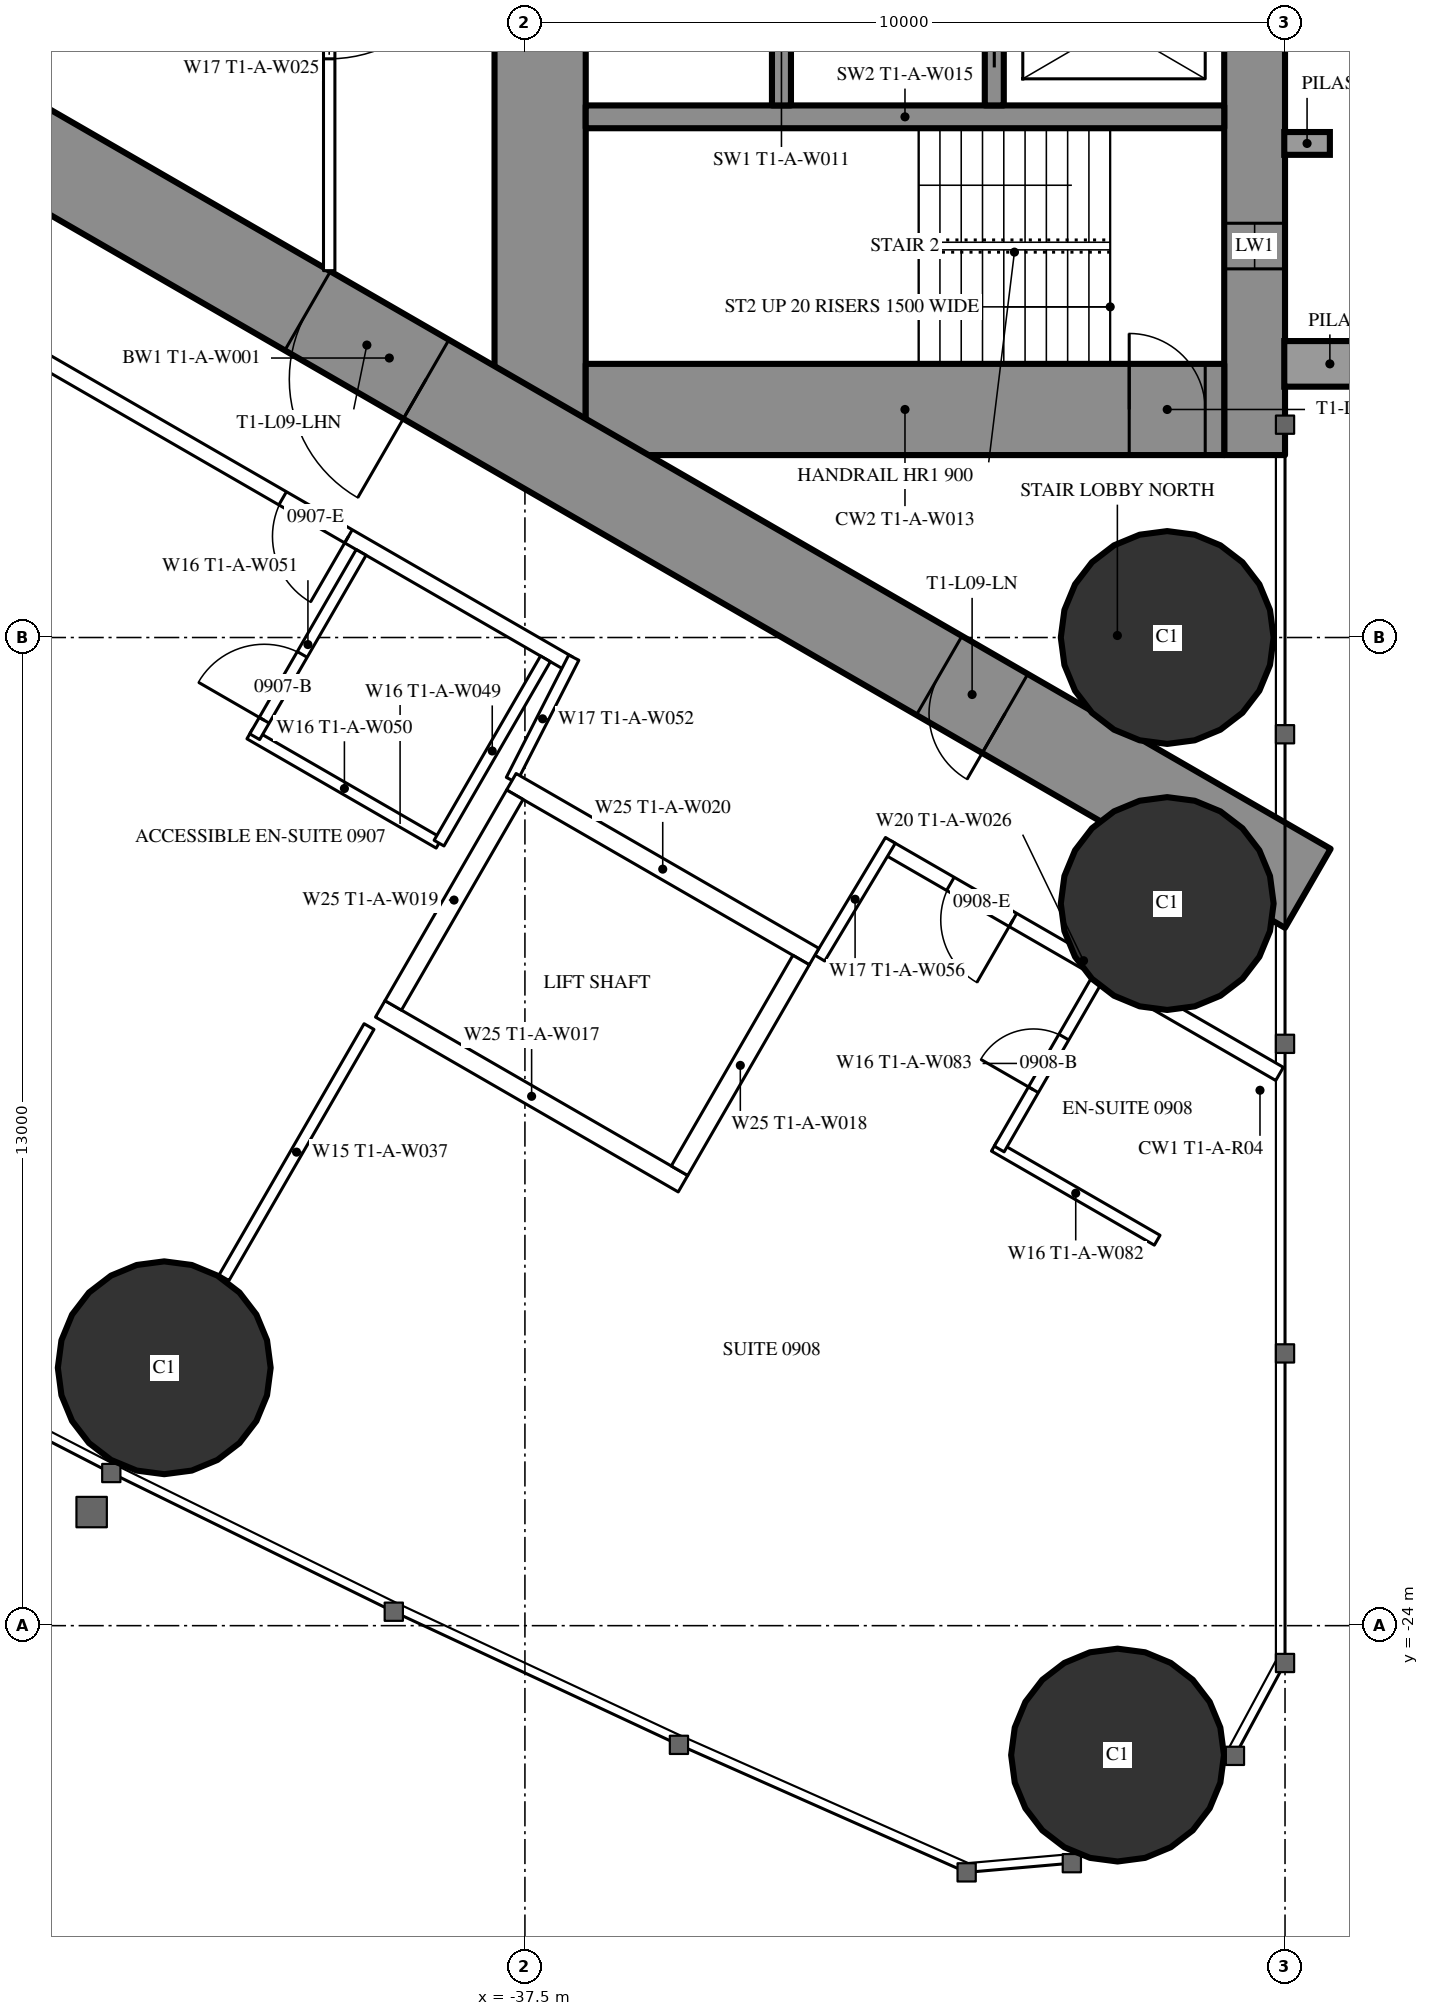
"""IFC4 building model, lengths in metres.
Left out: names, types, materials, properties, quantities, classifications, styles, units other than length and angle.
Written with IfcOpenShell. Run it as: python <this file> out.ifc"""

import sys

from ifc_helpers import new_model, si_unit, direction, frame, frame_2d, origin, origin_2d, place, context, subcontext, project, spatial, rectangle, hollow_circle, extrude, element, fill, save


model = new_model("IFC4")
c1 = context("Model", 3, precision=1e-05, world=origin(), true_north=direction((0.0, 1.0)))
c2 = subcontext(c1, "Body", "Model", "MODEL_VIEW")
j1 = project(units=[si_unit("LENGTHUNIT", "METRE"), si_unit("PLANEANGLEUNIT", "RADIAN")], contexts=[c1])
p1 = place(None, origin())
s1 = spatial("IfcSite", under=j1, at=p1, CompositionType="ELEMENT")
p2 = place(p1, origin())
s2 = spatial("IfcBuilding", under=s1, at=p2, CompositionType="ELEMENT")
p3 = place(p2, frame((0.0, 0.0, 39.0)))
s3 = spatial("IfcBuildingStorey", under=s2, at=p3, CompositionType="ELEMENT", Elevation=39.0)
for number, where, z_axis, x_axis in (
    (1, (-29.703, -25.703, 0.0), (0.0, 0.0, 1.0), (1.0, 0.0, 0.0)),
    (2, (-29.05, -11.0, 0.0), (0.0, 0.0, 1.0), (1.0, 0.0, 0.0)),
    (3, (-29.05, -14.5, 0.0), (0.0, 0.0, 1.0), (1.0, 0.0, 0.0)),
    (4, (-42.245, -20.607, 0.0), (0.0, 0.0, 1.0), (1.0, 0.0, 0.0)),
):
    element("IfcColumn", number, at=place(p3, frame(where, z_axis=z_axis, x_axis=x_axis)), inside=s3, PredefinedType="COLUMN", context=c2, shape_type="SweptSolid", body=[
        extrude(hollow_circle(Radius=1.4, WallThickness=0.12, at=origin_2d()), origin(), (0.0, 0.0, 1.0), 3.5),
    ])
p4 = place(p3, frame((-27.9, 8.6, 0.0), z_axis=(0.0, 0.0, 1.0), x_axis=(0.0, -1.0, 0.0)))
e5 = element("IfcWall", 5, at=p4, inside=s3, PredefinedType="SHEAR", context=c2, shape_type="SweptSolid", body=[
    extrude(rectangle(XDim=17.2, YDim=0.8, at=frame_2d((8.6, 0.0))), origin(), (0.0, 0.0, 1.0), 3.5),
])
p5 = place(p4, frame((2.45, 0.0, 0.6)))
e6 = element("IfcOpeningElement", 6, at=p5, cuts=e5, PredefinedType="OPENING", context=c2, shape_type="SweptSolid", body=[
    extrude(rectangle(XDim=0.6, YDim=2.1, at=frame_2d((0.3, 1.05))), frame((0.0, 0.41, 0.0), z_axis=(0.0, -1.0, 0.0), x_axis=(1.0, 0.0, 0.0)), (0.0, 0.0, 1.0), 0.82),
])
p6 = place(p4, frame((14.15, 0.0, 0.6)))
e7 = element("IfcOpeningElement", 7, at=p6, cuts=e5, PredefinedType="OPENING", context=c2, shape_type="SweptSolid", body=[
    extrude(rectangle(XDim=0.6, YDim=2.1, at=frame_2d((0.3, 1.05))), frame((0.0, 0.41, 0.0), z_axis=(0.0, -1.0, 0.0), x_axis=(1.0, 0.0, 0.0)), (0.0, 0.0, 1.0), 0.82),
])
p7 = place(p3, frame((-37.3, 8.6, 0.0), z_axis=(0.0, 0.0, 1.0), x_axis=(0.0, -1.0, 0.0)))
e8 = element("IfcWall", 8, at=p7, inside=s3, PredefinedType="SHEAR", context=c2, shape_type="SweptSolid", body=[
    extrude(rectangle(XDim=17.2, YDim=1.2, at=frame_2d((8.6, 0.0))), origin(), (0.0, 0.0, 1.0), 3.5),
])
p8 = place(p7, frame((7.7, 0.0, 0.0)))
e9 = element("IfcOpeningElement", 9, at=p8, cuts=e8, PredefinedType="OPENING", context=c2, shape_type="SweptSolid", body=[
    extrude(rectangle(XDim=1.8, YDim=2.2, at=frame_2d((0.9, 1.1))), frame((0.0, 0.61, 0.0), z_axis=(0.0, -1.0, 0.0), x_axis=(1.0, 0.0, 0.0)), (0.0, 0.0, 1.0), 1.22),
])
p9 = place(p3, frame((-28.3, -8.0, 0.0), z_axis=(0.0, 0.0, 1.0), x_axis=(-1.0, 0.0, 0.0)))
e10 = element("IfcWall", 10, at=p9, inside=s3, PredefinedType="SHEAR", context=c2, shape_type="SweptSolid", body=[
    extrude(rectangle(XDim=8.4, YDim=1.2, at=frame_2d((4.2, 0.0))), origin(), (0.0, 0.0, 1.0), 3.5),
])
p10 = place(p9, frame((0.25, 0.0, 0.0)))
e11 = element("IfcOpeningElement", 11, at=p10, cuts=e10, PredefinedType="OPENING", context=c2, shape_type="SweptSolid", body=[
    extrude(rectangle(XDim=1.0, YDim=2.2, at=frame_2d((0.5, 1.1))), frame((0.0, 0.61, 0.0), z_axis=(0.0, -1.0, 0.0), x_axis=(1.0, 0.0, 0.0)), (0.0, 0.0, 1.0), 1.22),
])
p11 = place(p3, frame((-28.3, -4.15, 0.0), z_axis=(0.0, 0.0, 1.0), x_axis=(-1.0, 0.0, 0.0)))
e12 = element("IfcWall", 12, at=p11, inside=s3, PredefinedType="SHEAR", context=c2, shape_type="SweptSolid", body=[
    extrude(rectangle(XDim=8.4, YDim=0.3, at=frame_2d((4.2, 0.0))), origin(), (0.0, 0.0, 1.0), 3.5),
])
p12 = place(p3, frame((-31.325, -1.9, 0.0), z_axis=(0.0, 0.0, 1.0), x_axis=(0.0, -1.0, 0.0)))
e13 = element("IfcWall", 13, at=p12, inside=s3, PredefinedType="SHEAR", context=c2, shape_type="SweptSolid", body=[
    extrude(rectangle(XDim=2.1, YDim=0.25, at=frame_2d((1.05, 0.0))), origin(), (0.0, 0.0, 1.0), 3.5),
])
p13 = place(p12, frame((0.5, 0.0, 0.0)))
e14 = element("IfcOpeningElement", 14, at=p13, cuts=e13, PredefinedType="OPENING", context=c2, shape_type="SweptSolid", body=[
    extrude(rectangle(XDim=1.1, YDim=2.2, at=frame_2d((0.55, 1.1))), frame((0.0, 0.135, 0.0), z_axis=(0.0, -1.0, 0.0), x_axis=(1.0, 0.0, 0.0)), (0.0, 0.0, 1.0), 0.27),
])
p14 = place(p3, frame((-34.125, -1.65, 0.0), z_axis=(0.0, 0.0, 1.0), x_axis=(0.0, -1.0, 0.0)))
e15 = element("IfcWall", 15, at=p14, inside=s3, PredefinedType="SHEAR", context=c2, shape_type="SweptSolid", body=[
    extrude(rectangle(XDim=2.35, YDim=0.25, at=frame_2d((1.175, 0.0))), origin(), (0.0, 0.0, 1.0), 3.5),
])
p15 = place(p14, frame((0.875, 0.0, 0.0)))
e16 = element("IfcOpeningElement", 16, at=p15, cuts=e15, PredefinedType="OPENING", context=c2, shape_type="SweptSolid", body=[
    extrude(rectangle(XDim=0.6, YDim=2.0, at=frame_2d((0.3, 1.0))), frame((0.0, 0.135, 0.0), z_axis=(0.0, -1.0, 0.0), x_axis=(1.0, 0.0, 0.0)), (0.0, 0.0, 1.0), 0.27),
])
p16 = place(p3, frame((-27.2, -14.3, 0.0), z_axis=(0.0, 0.0, 1.0), x_axis=(-0.866024021859, 0.500002393557, 0.0)))
e17 = element("IfcWall", 17, at=p16, inside=s3, PredefinedType="SHEAR", context=c2, shape_type="SweptSolid", body=[
    extrude(rectangle(XDim=27.907, YDim=1.2, at=frame_2d((13.954, 0.0))), origin(), (0.0, 0.0, 1.0), 3.5),
])
p17 = place(p16, frame((4.6, 0.0, 0.0)))
e18 = element("IfcOpeningElement", 18, at=p17, cuts=e17, PredefinedType="OPENING", context=c2, shape_type="SweptSolid", body=[
    extrude(rectangle(XDim=1.0, YDim=2.2, at=frame_2d((0.5, 1.1))), frame((0.0, 0.61, 0.0), z_axis=(0.0, -1.0, 0.0), x_axis=(1.0, 0.0, 0.0)), (0.0, 0.0, 1.0), 1.22),
])
p18 = place(p16, frame((13.395, 0.0, 0.0)))
e19 = element("IfcOpeningElement", 19, at=p18, cuts=e17, PredefinedType="OPENING", context=c2, shape_type="SweptSolid", body=[
    extrude(rectangle(XDim=1.8, YDim=2.2, at=frame_2d((0.9, 1.1))), frame((0.0, 0.61, 0.0), z_axis=(0.0, -1.0, 0.0), x_axis=(1.0, 0.0, 0.0)), (0.0, 0.0, 1.0), 1.22),
])
p19 = place(p3, frame((-39.551, -16.118, 0.0), z_axis=(0.0, 0.0, 1.0), x_axis=(-0.499986503906, -0.866033195618, 0.0)))
e20 = element("IfcWall", 20, at=p19, inside=s3, PredefinedType="PARTITIONING", context=c2, shape_type="SweptSolid", body=[
    extrude(rectangle(XDim=3.815, YDim=0.15, at=frame_2d((1.907, 0.0))), origin(), (0.0, 0.0, 1.0), 3.25),
])
p20 = place(p3, frame((-27.572, -16.741, 0.0), z_axis=(0.0, 0.0, 1.0), x_axis=(-0.866024464444, 0.500001626982, 0.0)))
e21 = element("IfcWall", 21, at=p20, inside=s3, PredefinedType="PARTITIONING", context=c2, shape_type="SweptSolid", body=[
    extrude(rectangle(XDim=5.955, YDim=0.2, at=frame_2d((2.978, 0.0))), origin(), (0.0, 0.0, 1.0), 3.25),
])
p21 = place(p20, frame((4.05, 0.0, 0.0)))
e22 = element("IfcOpeningElement", 22, at=p21, cuts=e21, PredefinedType="OPENING", context=c2, shape_type="SweptSolid", body=[
    extrude(rectangle(XDim=0.95, YDim=2.2, at=frame_2d((0.475, 1.1))), frame((0.0, 0.11, 0.0), z_axis=(0.0, -1.0, 0.0), x_axis=(1.0, 0.0, 0.0)), (0.0, 0.0, 1.0), 0.22),
])
p22 = place(p3, frame((-36.92, -11.344, 0.0), z_axis=(0.0, 0.0, 1.0), x_axis=(-0.866028313256, 0.499994960614, 0.0)))
e23 = element("IfcWall", 23, at=p22, inside=s3, PredefinedType="PARTITIONING", context=c2, shape_type="SweptSolid", body=[
    extrude(rectangle(XDim=22.568, YDim=0.2, at=frame_2d((11.284, 0.0))), origin(), (0.0, 0.0, 1.0), 3.25),
])
p23 = place(p22, frame((21.018, 0.0, 0.0)))
e24 = element("IfcOpeningElement", 24, at=p23, cuts=e23, PredefinedType="OPENING", context=c2, shape_type="SweptSolid", body=[
    extrude(rectangle(XDim=0.95, YDim=2.2, at=frame_2d((0.475, 1.1))), frame((0.0, 0.11, 0.0), z_axis=(0.0, -1.0, 0.0), x_axis=(1.0, 0.0, 0.0)), (0.0, 0.0, 1.0), 0.22),
])
p24 = place(p22, frame((3.35, 0.0, 0.0)))
e25 = element("IfcOpeningElement", 25, at=p24, cuts=e23, PredefinedType="OPENING", context=c2, shape_type="SweptSolid", body=[
    extrude(rectangle(XDim=1.0, YDim=2.2, at=frame_2d((0.5, 1.1))), frame((0.0, 0.11, 0.0), z_axis=(0.0, -1.0, 0.0), x_axis=(1.0, 0.0, 0.0)), (0.0, 0.0, 1.0), 0.22),
])
p25 = place(p3, frame((-36.857, -11.265, 0.0), z_axis=(0.0, 0.0, 1.0), x_axis=(-0.454225294761, -0.890886851176, 0.0)))
e26 = element("IfcWall", 26, at=p25, inside=s3, PredefinedType="PARTITIONING", context=c2, shape_type="SweptSolid", body=[
    extrude(rectangle(XDim=1.807, YDim=0.15, at=frame_2d((0.904, 0.0))), origin(), (0.0, 0.0, 1.0), 3.25),
])
p26 = place(p3, frame((-33.621, -15.218, 0.0), z_axis=(0.0, 0.0, 1.0), x_axis=(0.514336634837, 0.857588377991, 0.0)))
e27 = element("IfcWall", 27, at=p26, inside=s3, PredefinedType="PARTITIONING", context=c2, shape_type="SweptSolid", body=[
    extrude(rectangle(XDim=1.805, YDim=0.15, at=frame_2d((0.903, 0.0))), origin(), (0.0, 0.0, 1.0), 3.25),
])
p27 = place(p3, frame((-38.63, -13.705, 0.0), z_axis=(0.0, 0.0, 1.0), x_axis=(-0.866018712932, 0.500011588718, 0.0)))
e28 = element("IfcWall", 28, at=p27, inside=s3, PredefinedType="PARTITIONING", context=c2, shape_type="SweptSolid", body=[
    extrude(rectangle(XDim=2.875, YDim=0.15, at=frame_2d((1.438, 0.0))), origin(), (0.0, 0.0, 1.0), 3.25),
])
p28 = place(p3, frame((-39.655, -9.88, 0.0), z_axis=(0.0, 0.0, 1.0), x_axis=(-0.500049511043, -0.865996816683, 0.0)))
e29 = element("IfcWall", 29, at=p28, inside=s3, PredefinedType="PARTITIONING", context=c2, shape_type="SweptSolid", body=[
    extrude(rectangle(XDim=2.8, YDim=0.15, at=frame_2d((1.4, 0.0))), origin(), (0.0, 0.0, 1.0), 3.25),
])
p29 = place(p28, frame((1.55, 0.0, 0.0)))
e30 = element("IfcOpeningElement", 30, at=p29, cuts=e29, PredefinedType="OPENING", context=c2, shape_type="SweptSolid", body=[
    extrude(rectangle(XDim=1.0, YDim=2.2, at=frame_2d((0.5, 1.1))), frame((0.0, 0.085, 0.0), z_axis=(0.0, -1.0, 0.0), x_axis=(1.0, 0.0, 0.0)), (0.0, 0.0, 1.0), 0.17),
])
p30 = place(p3, frame((-37.23, -11.281, 0.0), z_axis=(0.0, 0.0, 1.0), x_axis=(-0.500049511043, -0.865996816683, 0.0)))
e31 = element("IfcWall", 31, at=p30, inside=s3, PredefinedType="PARTITIONING", context=c2, shape_type="SweptSolid", body=[
    extrude(rectangle(XDim=2.8, YDim=0.15, at=frame_2d((1.4, 0.0))), origin(), (0.0, 0.0, 1.0), 3.25),
])
p31 = place(p3, frame((-29.182, -18.929, 0.0), z_axis=(0.0, 0.0, 1.0), x_axis=(-0.866006523861, 0.500032699561, 0.0)))
e32 = element("IfcWall", 32, at=p31, inside=s3, PredefinedType="PARTITIONING", context=c2, shape_type="SweptSolid", body=[
    extrude(rectangle(XDim=2.475, YDim=0.15, at=frame_2d((1.237, 0.0))), origin(), (0.0, 0.0, 1.0), 3.25),
])
p32 = place(p3, frame((-29.96, -15.478, 0.0), z_axis=(0.0, 0.0, 1.0), x_axis=(-0.500006934395, -0.866021400173, 0.0)))
e33 = element("IfcWall", 33, at=p32, inside=s3, PredefinedType="PARTITIONING", context=c2, shape_type="SweptSolid", body=[
    extrude(rectangle(XDim=2.6, YDim=0.15, at=frame_2d((1.3, 0.0))), origin(), (0.0, 0.0, 1.0), 3.25),
])
p33 = place(p32, frame((0.9, 0.0, 0.0)))
e34 = element("IfcOpeningElement", 34, at=p33, cuts=e33, PredefinedType="OPENING", context=c2, shape_type="SweptSolid", body=[
    extrude(rectangle(XDim=0.8, YDim=2.2, at=frame_2d((0.4, 1.1))), frame((0.0, 0.085, 0.0), z_axis=(0.0, -1.0, 0.0), x_axis=(1.0, 0.0, 0.0)), (0.0, 0.0, 1.0), 0.17),
])
p34 = place(p3, frame((-40.075, 1.2, 0.0), z_axis=(0.0, 0.0, 1.0), x_axis=(0.0, -1.0, 0.0)))
e35 = element("IfcWall", 35, at=p34, inside=s3, PredefinedType="PARTITIONING", context=c2, shape_type="SweptSolid", body=[
    extrude(rectangle(XDim=7.374, YDim=0.15, at=frame_2d((3.687, 0.0))), origin(), (0.0, 0.0, 1.0), 3.25),
])
p35 = place(p34, frame((2.787, 0.0, 0.0)))
e36 = element("IfcOpeningElement", 36, at=p35, cuts=e35, PredefinedType="OPENING", context=c2, shape_type="SweptSolid", body=[
    extrude(rectangle(XDim=1.8, YDim=2.2, at=frame_2d((0.9, 1.1))), frame((0.0, 0.085, 0.0), z_axis=(0.0, -1.0, 0.0), x_axis=(1.0, 0.0, 0.0)), (0.0, 0.0, 1.0), 0.17),
])
p36 = place(p3, frame((-33.696, -15.197, 0.0), z_axis=(0.0, 0.0, 1.0), x_axis=(-0.865976953817, 0.500083908417, 0.0)))
e37 = element("IfcWall", 37, at=p36, inside=s3, PredefinedType="PARTITIONING", context=c2, shape_type="SweptSolid", body=[
    extrude(rectangle(XDim=4.599, YDim=0.25, at=frame_2d((2.3, 0.0))), origin(), (0.0, 0.0, 1.0), 3.25),
])
p37 = place(p3, frame((-35.42, -18.186, 0.0), z_axis=(0.0, 0.0, 1.0), x_axis=(-0.865990227814, 0.50006092162, 0.0)))
e38 = element("IfcWall", 38, at=p37, inside=s3, PredefinedType="PARTITIONING", context=c2, shape_type="SweptSolid", body=[
    extrude(rectangle(XDim=4.6, YDim=0.25, at=frame_2d((2.3, 0.0))), origin(), (0.0, 0.0, 1.0), 3.25),
])
p38 = place(p3, frame((-33.866, -15.243, 0.0), z_axis=(0.0, 0.0, 1.0), x_axis=(-0.499929347863, -0.866066190972, 0.0)))
e39 = element("IfcWall", 39, at=p38, inside=s3, PredefinedType="PARTITIONING", context=c2, shape_type="SweptSolid", body=[
    extrude(rectangle(XDim=3.201, YDim=0.25, at=frame_2d((1.6, 0.0))), origin(), (0.0, 0.0, 1.0), 3.25),
])
p39 = place(p3, frame((-37.633, -13.068, 0.0), z_axis=(0.0, 0.0, 1.0), x_axis=(-0.499872130319, -0.866099216793, 0.0)))
e40 = element("IfcWall", 40, at=p39, inside=s3, PredefinedType="PARTITIONING", context=c2, shape_type="SweptSolid", body=[
    extrude(rectangle(XDim=3.2, YDim=0.25, at=frame_2d((1.6, 0.0))), origin(), (0.0, 0.0, 1.0), 3.25),
])
p40 = place(p29, origin())
e41 = element("IfcDoor", 41, at=p40, inside=s3, OperationType="SINGLE_SWING_RIGHT", PredefinedType="DOOR", context=c2, shape_type="SweptSolid", body=[
    extrude(rectangle(XDim=1.0, YDim=2.2, at=frame_2d((0.5, 1.1))), frame((0.0, 0.025, 0.0), z_axis=(0.0, -1.0, 0.0), x_axis=(1.0, 0.0, 0.0)), (0.0, 0.0, 1.0), 0.05),
])
fill(e30, e41)
p41 = place(p24, origin())
e42 = element("IfcDoor", 42, at=p41, inside=s3, OperationType="SINGLE_SWING_LEFT", PredefinedType="DOOR", context=c2, shape_type="SweptSolid", body=[
    extrude(rectangle(XDim=1.0, YDim=2.2, at=frame_2d((0.5, 1.1))), frame((0.0, 0.025, 0.0), z_axis=(0.0, -1.0, 0.0), x_axis=(1.0, 0.0, 0.0)), (0.0, 0.0, 1.0), 0.05),
])
fill(e25, e42)
p42 = place(p33, origin())
e43 = element("IfcDoor", 43, at=p42, inside=s3, OperationType="SINGLE_SWING_RIGHT", PredefinedType="DOOR", context=c2, shape_type="SweptSolid", body=[
    extrude(rectangle(XDim=0.8, YDim=2.2, at=frame_2d((0.4, 1.1))), frame((0.0, 0.025, 0.0), z_axis=(0.0, -1.0, 0.0), x_axis=(1.0, 0.0, 0.0)), (0.0, 0.0, 1.0), 0.05),
])
fill(e34, e43)
p43 = place(p21, origin())
e44 = element("IfcDoor", 44, at=p43, inside=s3, OperationType="SINGLE_SWING_LEFT", PredefinedType="DOOR", context=c2, shape_type="SweptSolid", body=[
    extrude(rectangle(XDim=0.95, YDim=2.2, at=frame_2d((0.475, 1.1))), frame((0.0, 0.025, 0.0), z_axis=(0.0, -1.0, 0.0), x_axis=(1.0, 0.0, 0.0)), (0.0, 0.0, 1.0), 0.05),
])
fill(e22, e44)
p44 = place(p35, origin())
e45 = element("IfcDoor", 45, at=p44, inside=s3, OperationType="DOUBLE_DOOR_SINGLE_SWING", PredefinedType="DOOR", context=c2, shape_type="SweptSolid", body=[
    extrude(rectangle(XDim=1.8, YDim=2.2, at=frame_2d((0.9, 1.1))), frame((0.0, 0.025, 0.0), z_axis=(0.0, -1.0, 0.0), x_axis=(1.0, 0.0, 0.0)), (0.0, 0.0, 1.0), 0.05),
])
fill(e36, e45)
p45 = place(p17, origin())
e46 = element("IfcDoor", 46, at=p45, inside=s3, OperationType="SINGLE_SWING_LEFT", PredefinedType="DOOR", context=c2, shape_type="SweptSolid", body=[
    extrude(rectangle(XDim=1.0, YDim=2.2, at=frame_2d((0.5, 1.1))), frame((0.0, 0.025, 0.0), z_axis=(0.0, -1.0, 0.0), x_axis=(1.0, 0.0, 0.0)), (0.0, 0.0, 1.0), 0.05),
])
fill(e18, e46)
p46 = place(p18, origin())
e47 = element("IfcDoor", 47, at=p46, inside=s3, OperationType="DOUBLE_DOOR_SINGLE_SWING", PredefinedType="DOOR", context=c2, shape_type="SweptSolid", body=[
    extrude(rectangle(XDim=1.8, YDim=2.2, at=frame_2d((0.9, 1.1))), frame((0.0, 0.025, 0.0), z_axis=(0.0, -1.0, 0.0), x_axis=(1.0, 0.0, 0.0)), (0.0, 0.0, 1.0), 0.05),
])
fill(e19, e47)
p47 = place(p10, origin())
e48 = element("IfcDoor", 48, at=p47, inside=s3, OperationType="SINGLE_SWING_RIGHT", PredefinedType="DOOR", context=c2, shape_type="SweptSolid", body=[
    extrude(rectangle(XDim=1.0, YDim=2.2, at=frame_2d((0.5, 1.1))), frame((0.0, 0.025, 0.0), z_axis=(0.0, -1.0, 0.0), x_axis=(1.0, 0.0, 0.0)), (0.0, 0.0, 1.0), 0.05),
])
fill(e11, e48)
p48 = place(p13, origin())
e49 = element("IfcDoor", 49, at=p48, inside=s3, OperationType="SLIDING_TO_LEFT", PredefinedType="USERDEFINED", context=c2, shape_type="SweptSolid", body=[
    extrude(rectangle(XDim=1.1, YDim=2.2, at=frame_2d((0.55, 1.1))), frame((0.0, 0.025, 0.0), z_axis=(0.0, -1.0, 0.0), x_axis=(1.0, 0.0, 0.0)), (0.0, 0.0, 1.0), 0.05),
])
fill(e14, e49)
p49 = place(p6, origin())
e50 = element("IfcWindow", 50, at=p49, inside=s3, PartitioningType="SINGLE_PANEL", PredefinedType="WINDOW", context=c2, shape_type="SweptSolid", body=[
    extrude(rectangle(XDim=0.6, YDim=2.1, at=frame_2d((0.3, 1.05))), frame((0.0, 0.03, 0.0), z_axis=(0.0, -1.0, 0.0), x_axis=(1.0, 0.0, 0.0)), (0.0, 0.0, 1.0), 0.06),
])
fill(e7, e50)
save(model, sys.argv[1])
